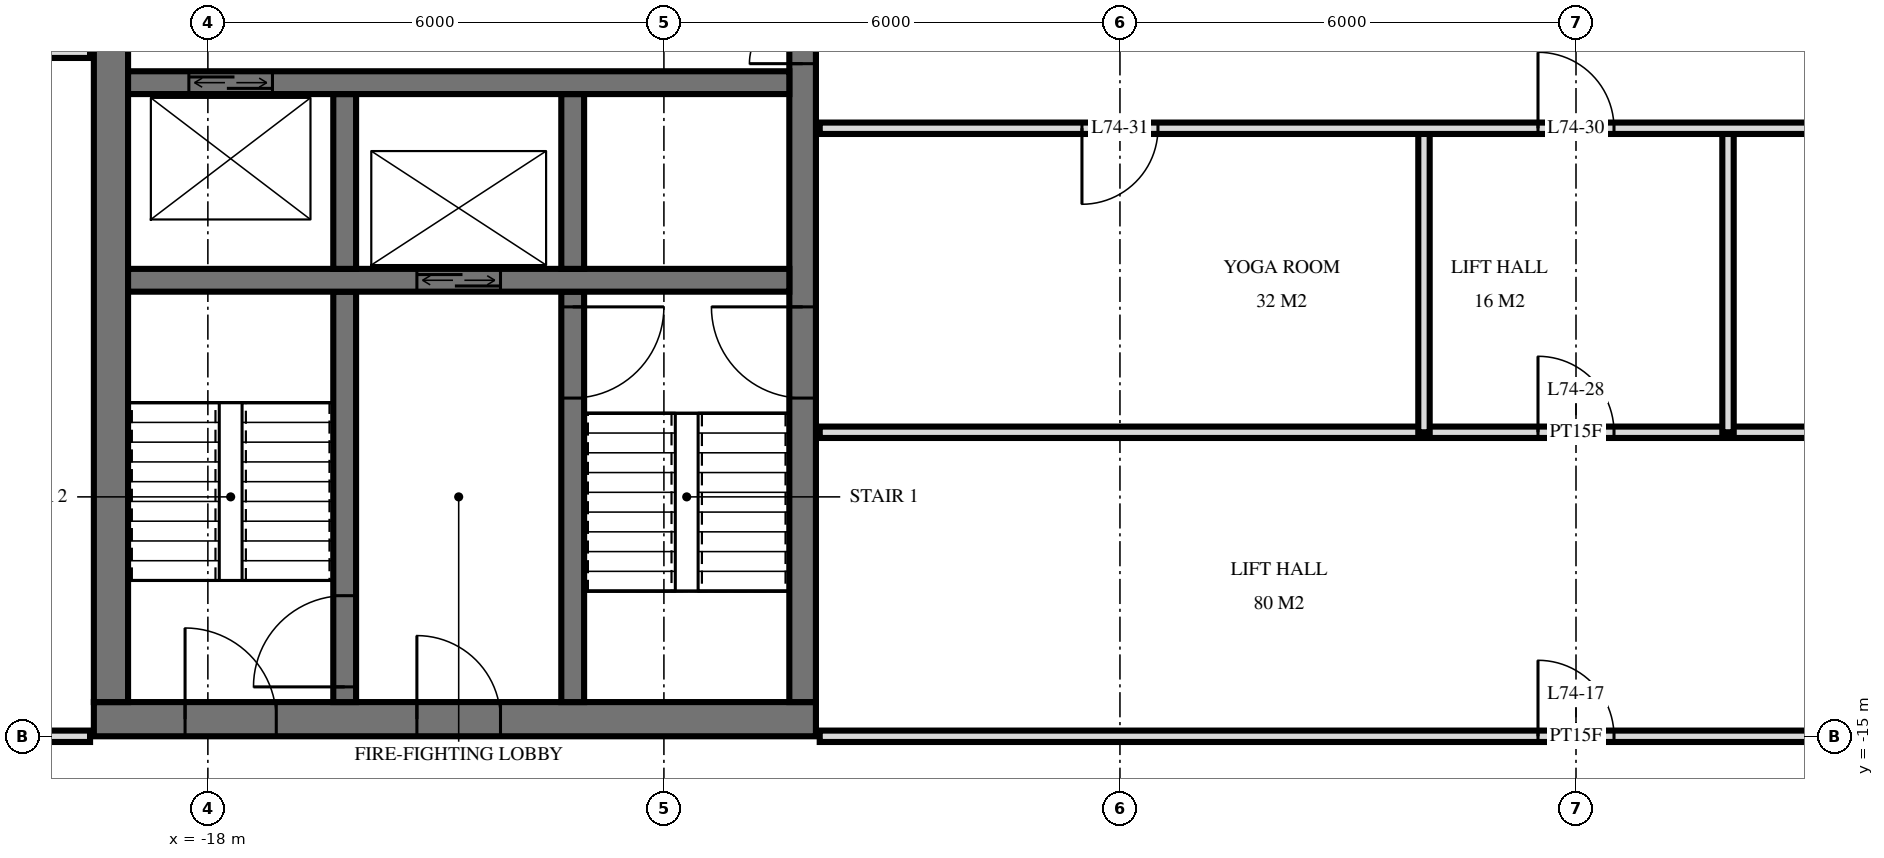
"""IFC4 building model, lengths in metres.
Left out: names, types, materials, properties, quantities, classifications, styles, units other than length and angle.
Written with IfcOpenShell. Run it as: python <this file> out.ifc"""

import sys

from ifc_helpers import new_model, si_unit, direction, frame, frame_2d, origin, place, context, subcontext, project, spatial, rectangle, extrude, element, fill, save


model = new_model("IFC4")
c1 = context("Model", 3, precision=1e-05, world=origin(), true_north=direction((0.0, 1.0)))
c2 = subcontext(c1, "Body", "Model", "MODEL_VIEW")
j1 = project(units=[si_unit("LENGTHUNIT", "METRE"), si_unit("PLANEANGLEUNIT", "RADIAN")], contexts=[c1])
p1 = place(None, origin())
s1 = spatial("IfcSite", under=j1, at=p1, CompositionType="ELEMENT")
p2 = place(p1, origin())
s2 = spatial("IfcBuilding", under=s1, at=p2, CompositionType="ELEMENT")
p3 = place(p2, frame((0.0, 0.0, 280.6)))
s3 = spatial("IfcBuildingStorey", under=s2, at=p3, CompositionType="ELEMENT", Elevation=280.6)
p4 = place(p3, frame((-19.5, -14.775, 0.0), z_axis=(0.0, 0.0, 1.0), x_axis=(1.0, 0.0, 0.0)))
e1 = element("IfcWall", 1, at=p4, inside=s3, PredefinedType="SHEAR", context=c2, shape_type="SweptSolid", body=[
    extrude(rectangle(XDim=9.5, YDim=0.45, at=frame_2d((4.75, 0.0))), origin(), (0.0, 0.0, 1.0), 3.5),
])
p5 = place(p4, frame((1.2, 0.0, 0.0)))
e2 = element("IfcOpeningElement", 2, at=p5, cuts=e1, PredefinedType="OPENING", context=c2, shape_type="SweptSolid", body=[
    extrude(rectangle(XDim=1.2, YDim=2.1, at=frame_2d((0.6, 1.05))), frame((0.0, 0.235, 0.0), z_axis=(0.0, -1.0, 0.0), x_axis=(1.0, 0.0, 0.0)), (0.0, 0.0, 1.0), 0.47),
])
p6 = place(p4, frame((4.25, 0.0, 0.0)))
e3 = element("IfcOpeningElement", 3, at=p6, cuts=e1, PredefinedType="OPENING", context=c2, shape_type="SweptSolid", body=[
    extrude(rectangle(XDim=1.1, YDim=2.1, at=frame_2d((0.55, 1.05))), frame((0.0, 0.235, 0.0), z_axis=(0.0, -1.0, 0.0), x_axis=(1.0, 0.0, 0.0)), (0.0, 0.0, 1.0), 0.47),
])
p7 = place(p3, frame((-10.175, -14.55, 0.0), z_axis=(0.0, 0.0, 1.0), x_axis=(0.0, 1.0, 0.0)))
e4 = element("IfcWall", 4, at=p7, inside=s3, PredefinedType="SHEAR", context=c2, shape_type="SweptSolid", body=[
    extrude(rectangle(XDim=14.1, YDim=0.35, at=frame_2d((7.05, 0.0))), origin(), (0.0, 0.0, 1.0), 3.5),
])
p8 = place(p7, frame((8.4, 0.0, 0.0)))
e5 = element("IfcOpeningElement", 5, at=p8, cuts=e4, PredefinedType="OPENING", context=c2, shape_type="SweptSolid", body=[
    extrude(rectangle(XDim=1.4, YDim=2.4, at=frame_2d((0.7, 1.2))), frame((0.0, 0.185, 0.0), z_axis=(0.0, -1.0, 0.0), x_axis=(1.0, 0.0, 0.0)), (0.0, 0.0, 1.0), 0.37),
])
p9 = place(p7, frame((10.0, 0.0, 0.0)))
e6 = element("IfcOpeningElement", 6, at=p9, cuts=e4, PredefinedType="OPENING", context=c2, shape_type="SweptSolid", body=[
    extrude(rectangle(XDim=1.4, YDim=2.4, at=frame_2d((0.7, 1.2))), frame((0.0, 0.185, 0.0), z_axis=(0.0, -1.0, 0.0), x_axis=(1.0, 0.0, 0.0)), (0.0, 0.0, 1.0), 0.37),
])
p10 = place(p7, frame((4.0, 0.0, 0.0)))
e7 = element("IfcOpeningElement", 7, at=p10, cuts=e4, PredefinedType="OPENING", context=c2, shape_type="SweptSolid", body=[
    extrude(rectangle(XDim=1.2, YDim=2.1, at=frame_2d((0.6, 1.05))), frame((0.0, 0.185, 0.0), z_axis=(0.0, -1.0, 0.0), x_axis=(1.0, 0.0, 0.0)), (0.0, 0.0, 1.0), 0.37),
])
p11 = place(p3, frame((-19.275, -14.55, 0.0), z_axis=(0.0, 0.0, 1.0), x_axis=(0.0, 1.0, 0.0)))
e8 = element("IfcWall", 8, at=p11, inside=s3, PredefinedType="SHEAR", context=c2, shape_type="SweptSolid", body=[
    extrude(rectangle(XDim=14.1, YDim=0.45, at=frame_2d((7.05, 0.0))), origin(), (0.0, 0.0, 1.0), 3.5),
])
p12 = place(p3, frame((-19.05, -6.4, 0.0), z_axis=(0.0, 0.0, 1.0), x_axis=(1.0, 0.0, 0.0)))
e9 = element("IfcWall", 9, at=p12, inside=s3, PredefinedType="SHEAR", context=c2, shape_type="SweptSolid", body=[
    extrude(rectangle(XDim=8.7, YDim=0.3, at=frame_2d((4.35, 0.0))), origin(), (0.0, 0.0, 1.0), 3.5),
])
p13 = place(p12, frame((0.8, 0.0, 0.0)))
e10 = element("IfcOpeningElement", 10, at=p13, cuts=e9, PredefinedType="OPENING", context=c2, shape_type="SweptSolid", body=[
    extrude(rectangle(XDim=1.1, YDim=2.1, at=frame_2d((0.55, 1.05))), frame((0.0, 0.16, 0.0), z_axis=(0.0, -1.0, 0.0), x_axis=(1.0, 0.0, 0.0)), (0.0, 0.0, 1.0), 0.32),
])
p14 = place(p3, frame((-19.05, -9.0, 0.0), z_axis=(0.0, 0.0, 1.0), x_axis=(1.0, 0.0, 0.0)))
e11 = element("IfcWall", 11, at=p14, inside=s3, PredefinedType="SHEAR", context=c2, shape_type="SweptSolid", body=[
    extrude(rectangle(XDim=8.7, YDim=0.3, at=frame_2d((4.35, 0.0))), origin(), (0.0, 0.0, 1.0), 3.5),
])
p15 = place(p14, frame((3.8, 0.0, 0.0)))
e12 = element("IfcOpeningElement", 12, at=p15, cuts=e11, PredefinedType="OPENING", context=c2, shape_type="SweptSolid", body=[
    extrude(rectangle(XDim=1.1, YDim=2.1, at=frame_2d((0.55, 1.05))), frame((0.0, 0.16, 0.0), z_axis=(0.0, -1.0, 0.0), x_axis=(1.0, 0.0, 0.0)), (0.0, 0.0, 1.0), 0.32),
])
p16 = place(p3, frame((-13.2, -8.85, 0.0), z_axis=(0.0, 0.0, 1.0), x_axis=(0.0, 1.0, 0.0)))
e13 = element("IfcWall", 13, at=p16, inside=s3, PredefinedType="SHEAR", context=c2, shape_type="SweptSolid", body=[
    extrude(rectangle(XDim=2.3, YDim=0.3, at=frame_2d((1.15, 0.0))), origin(), (0.0, 0.0, 1.0), 3.5),
])
p17 = place(p3, frame((-13.2, -14.55, 0.0), z_axis=(0.0, 0.0, 1.0), x_axis=(0.0, 1.0, 0.0)))
e14 = element("IfcWall", 14, at=p17, inside=s3, PredefinedType="SHEAR", context=c2, shape_type="SweptSolid", body=[
    extrude(rectangle(XDim=5.4, YDim=0.3, at=frame_2d((2.7, 0.0))), origin(), (0.0, 0.0, 1.0), 3.5),
])
p18 = place(p17, frame((4.0, 0.0, 0.0)))
e15 = element("IfcOpeningElement", 15, at=p18, cuts=e14, PredefinedType="OPENING", context=c2, shape_type="SweptSolid", body=[
    extrude(rectangle(XDim=1.2, YDim=2.1, at=frame_2d((0.6, 1.05))), frame((0.0, 0.16, 0.0), z_axis=(0.0, -1.0, 0.0), x_axis=(1.0, 0.0, 0.0)), (0.0, 0.0, 1.0), 0.32),
])
p19 = place(p3, frame((-16.2, -8.85, 0.0), z_axis=(0.0, 0.0, 1.0), x_axis=(0.0, 1.0, 0.0)))
e16 = element("IfcWall", 16, at=p19, inside=s3, PredefinedType="SHEAR", context=c2, shape_type="SweptSolid", body=[
    extrude(rectangle(XDim=2.3, YDim=0.3, at=frame_2d((1.15, 0.0))), origin(), (0.0, 0.0, 1.0), 3.5),
])
p20 = place(p3, frame((-16.2, -14.55, 0.0), z_axis=(0.0, 0.0, 1.0), x_axis=(0.0, 1.0, 0.0)))
e17 = element("IfcWall", 17, at=p20, inside=s3, PredefinedType="SHEAR", context=c2, shape_type="SweptSolid", body=[
    extrude(rectangle(XDim=5.4, YDim=0.3, at=frame_2d((2.7, 0.0))), origin(), (0.0, 0.0, 1.0), 3.5),
])
p21 = place(p20, frame((0.2, 0.0, 0.0)))
e18 = element("IfcOpeningElement", 18, at=p21, cuts=e17, PredefinedType="OPENING", context=c2, shape_type="SweptSolid", body=[
    extrude(rectangle(XDim=1.2, YDim=2.1, at=frame_2d((0.6, 1.05))), frame((0.0, 0.16, 0.0), z_axis=(0.0, -1.0, 0.0), x_axis=(1.0, 0.0, 0.0)), (0.0, 0.0, 1.0), 0.32),
])
for number, where, z_axis, x_axis in (
    (19, (2.0, -11.0, 0.0), (0.0, 0.0, 1.0), (0.0, 1.0, 0.0)),
    (20, (-2.0, -11.0, 0.0), (0.0, 0.0, 1.0), (0.0, 1.0, 0.0)),
):
    element("IfcWall", number, at=place(p3, frame(where, z_axis=z_axis, x_axis=x_axis)), inside=s3, PredefinedType="PARTITIONING", context=c2, shape_type="SweptSolid", body=[
        extrude(rectangle(XDim=4.0, YDim=0.15, at=frame_2d((2.0, 0.0))), origin(), (0.0, 0.0, 1.0), 3.22),
    ])
p22 = place(p3, frame((-22.92, -15.0, 0.0), z_axis=(0.0, 0.0, 1.0), x_axis=(1.0, 0.0, 0.0)))
e21 = element("IfcWall", 21, at=p22, inside=s3, PredefinedType="PARTITIONING", context=c2, shape_type="SweptSolid", body=[
    extrude(rectangle(XDim=3.37, YDim=0.15, at=frame_2d((1.685, 0.0))), origin(), (0.0, 0.0, 1.0), 3.22),
])
p23 = place(p22, frame((1.47, 0.0, 0.0)))
e22 = element("IfcOpeningElement", 22, at=p23, cuts=e21, PredefinedType="OPENING", context=c2, shape_type="SweptSolid", body=[
    extrude(rectangle(XDim=1.0, YDim=2.1, at=frame_2d((0.5, 1.05))), frame((0.0, 0.085, 0.0), z_axis=(0.0, -1.0, 0.0), x_axis=(1.0, 0.0, 0.0)), (0.0, 0.0, 1.0), 0.17),
])
p24 = place(p3, frame((-9.95, -15.0, 0.0), z_axis=(0.0, 0.0, 1.0), x_axis=(1.0, 0.0, 0.0)))
e23 = element("IfcWall", 23, at=p24, inside=s3, PredefinedType="PARTITIONING", context=c2, shape_type="SweptSolid", body=[
    extrude(rectangle(XDim=19.9, YDim=0.15, at=frame_2d((9.95, 0.0))), origin(), (0.0, 0.0, 1.0), 2.584),
])
p25 = place(p24, frame((9.45, 0.0, 0.0)))
e24 = element("IfcOpeningElement", 24, at=p25, cuts=e23, PredefinedType="OPENING", context=c2, shape_type="SweptSolid", body=[
    extrude(rectangle(XDim=1.0, YDim=2.1, at=frame_2d((0.5, 1.05))), frame((0.0, 0.085, 0.0), z_axis=(0.0, -1.0, 0.0), x_axis=(1.0, 0.0, 0.0)), (0.0, 0.0, 1.0), 0.17),
])
p26 = place(p3, frame((-9.95, -11.0, 0.0), z_axis=(0.0, 0.0, 1.0), x_axis=(1.0, 0.0, 0.0)))
e25 = element("IfcWall", 25, at=p26, inside=s3, PredefinedType="PARTITIONING", context=c2, shape_type="SweptSolid", body=[
    extrude(rectangle(XDim=19.9, YDim=0.15, at=frame_2d((9.95, 0.0))), origin(), (0.0, 0.0, 1.0), 3.22),
])
p27 = place(p26, frame((9.45, 0.0, 0.0)))
e26 = element("IfcOpeningElement", 26, at=p27, cuts=e25, PredefinedType="OPENING", context=c2, shape_type="SweptSolid", body=[
    extrude(rectangle(XDim=1.0, YDim=2.1, at=frame_2d((0.5, 1.05))), frame((0.0, 0.085, 0.0), z_axis=(0.0, -1.0, 0.0), x_axis=(1.0, 0.0, 0.0)), (0.0, 0.0, 1.0), 0.17),
])
p28 = place(p26, frame((15.45, 0.0, 0.0)))
e27 = element("IfcOpeningElement", 27, at=p28, cuts=e25, PredefinedType="OPENING", context=c2, shape_type="SweptSolid", body=[
    extrude(rectangle(XDim=1.0, YDim=2.1, at=frame_2d((0.5, 1.05))), frame((0.0, 0.085, 0.0), z_axis=(0.0, -1.0, 0.0), x_axis=(1.0, 0.0, 0.0)), (0.0, 0.0, 1.0), 0.17),
])
p29 = place(p3, frame((-9.95, -7.0, 0.0), z_axis=(0.0, 0.0, 1.0), x_axis=(1.0, 0.0, 0.0)))
e28 = element("IfcWall", 28, at=p29, inside=s3, PredefinedType="PARTITIONING", context=c2, shape_type="SweptSolid", body=[
    extrude(rectangle(XDim=19.9, YDim=0.15, at=frame_2d((9.95, 0.0))), origin(), (0.0, 0.0, 1.0), 3.22),
])
p30 = place(p29, frame((9.45, 0.0, 0.0)))
e29 = element("IfcOpeningElement", 29, at=p30, cuts=e28, PredefinedType="OPENING", context=c2, shape_type="SweptSolid", body=[
    extrude(rectangle(XDim=1.0, YDim=2.1, at=frame_2d((0.5, 1.05))), frame((0.0, 0.085, 0.0), z_axis=(0.0, -1.0, 0.0), x_axis=(1.0, 0.0, 0.0)), (0.0, 0.0, 1.0), 0.17),
])
p31 = place(p29, frame((3.45, 0.0, 0.0)))
e30 = element("IfcOpeningElement", 30, at=p31, cuts=e28, PredefinedType="OPENING", context=c2, shape_type="SweptSolid", body=[
    extrude(rectangle(XDim=1.0, YDim=2.1, at=frame_2d((0.5, 1.05))), frame((0.0, 0.085, 0.0), z_axis=(0.0, -1.0, 0.0), x_axis=(1.0, 0.0, 0.0)), (0.0, 0.0, 1.0), 0.17),
])
p32 = place(p3, frame((-22.92, -6.0, 0.0), z_axis=(0.0, 0.0, 1.0), x_axis=(1.0, 0.0, 0.0)))
e31 = element("IfcWall", 31, at=p32, inside=s3, PredefinedType="PARTITIONING", context=c2, shape_type="SweptSolid", body=[
    extrude(rectangle(XDim=3.37, YDim=0.15, at=frame_2d((1.685, 0.0))), origin(), (0.0, 0.0, 1.0), 3.22),
])
p33 = place(p32, frame((1.17, 0.0, 0.0)))
e32 = element("IfcOpeningElement", 32, at=p33, cuts=e31, PredefinedType="OPENING", context=c2, shape_type="SweptSolid", body=[
    extrude(rectangle(XDim=0.9, YDim=2.1, at=frame_2d((0.45, 1.05))), frame((0.0, 0.085, 0.0), z_axis=(0.0, -1.0, 0.0), x_axis=(1.0, 0.0, 0.0)), (0.0, 0.0, 1.0), 0.17),
])
p34 = place(p15, origin())
e33 = element("IfcDoor", 33, at=p34, inside=s3, OperationType="DOUBLE_DOOR_SLIDING", PredefinedType="USERDEFINED", context=c2, shape_type="SweptSolid", body=[
    extrude(rectangle(XDim=1.1, YDim=2.1, at=frame_2d((0.55, 1.05))), frame((0.0, 0.025, 0.0), z_axis=(0.0, -1.0, 0.0), x_axis=(1.0, 0.0, 0.0)), (0.0, 0.0, 1.0), 0.05),
])
fill(e12, e33)
p35 = place(p13, origin())
e34 = element("IfcDoor", 34, at=p35, inside=s3, OperationType="DOUBLE_DOOR_SLIDING", PredefinedType="USERDEFINED", context=c2, shape_type="SweptSolid", body=[
    extrude(rectangle(XDim=1.1, YDim=2.1, at=frame_2d((0.55, 1.05))), frame((0.0, 0.025, 0.0), z_axis=(0.0, -1.0, 0.0), x_axis=(1.0, 0.0, 0.0)), (0.0, 0.0, 1.0), 0.05),
])
fill(e10, e34)
p36 = place(p8, origin())
e35 = element("IfcDoor", 35, at=p36, inside=s3, OperationType="DOUBLE_DOOR_SINGLE_SWING", PredefinedType="DOOR", context=c2, shape_type="SweptSolid", body=[
    extrude(rectangle(XDim=1.4, YDim=2.4, at=frame_2d((0.7, 1.2))), frame((0.0, 0.025, 0.0), z_axis=(0.0, -1.0, 0.0), x_axis=(1.0, 0.0, 0.0)), (0.0, 0.0, 1.0), 0.05),
])
fill(e5, e35)
p37 = place(p10, origin())
e36 = element("IfcDoor", 36, at=p37, inside=s3, OperationType="SINGLE_SWING_LEFT", PredefinedType="DOOR", context=c2, shape_type="SweptSolid", body=[
    extrude(rectangle(XDim=1.2, YDim=2.1, at=frame_2d((0.6, 1.05))), frame((0.0, 0.025, 0.0), z_axis=(0.0, -1.0, 0.0), x_axis=(1.0, 0.0, 0.0)), (0.0, 0.0, 1.0), 0.05),
])
fill(e7, e36)
p38 = place(p5, origin())
e37 = element("IfcDoor", 37, at=p38, inside=s3, OperationType="SINGLE_SWING_RIGHT", PredefinedType="DOOR", context=c2, shape_type="SweptSolid", body=[
    extrude(rectangle(XDim=1.2, YDim=2.1, at=frame_2d((0.6, 1.05))), frame((0.0, 0.025, 0.0), z_axis=(0.0, -1.0, 0.0), x_axis=(1.0, 0.0, 0.0)), (0.0, 0.0, 1.0), 0.05),
])
fill(e2, e37)
p39 = place(p6, origin())
e38 = element("IfcDoor", 38, at=p39, inside=s3, OperationType="SINGLE_SWING_RIGHT", PredefinedType="DOOR", context=c2, shape_type="SweptSolid", body=[
    extrude(rectangle(XDim=1.1, YDim=2.1, at=frame_2d((0.55, 1.05))), frame((0.0, 0.025, 0.0), z_axis=(0.0, -1.0, 0.0), x_axis=(1.0, 0.0, 0.0)), (0.0, 0.0, 1.0), 0.05),
])
fill(e3, e38)
p40 = place(p18, frame((0.6, 0.0, 0.0), z_axis=(0.0, 0.0, 1.0), x_axis=(-1.0, 0.0, 0.0)))
e39 = element("IfcDoor", 39, at=p40, inside=s3, OperationType="SINGLE_SWING_RIGHT", PredefinedType="DOOR", context=c2, shape_type="SweptSolid", body=[
    extrude(rectangle(XDim=1.2, YDim=2.1, at=frame_2d((0.0, 1.05))), frame((0.0, -0.025, 0.0), z_axis=(0.0, 1.0, 0.0), x_axis=(-1.0, 0.0, 0.0)), (0.0, 0.0, 1.0), 0.05),
])
fill(e15, e39)
p41 = place(p21, origin())
e40 = element("IfcDoor", 40, at=p41, inside=s3, OperationType="SINGLE_SWING_RIGHT", PredefinedType="DOOR", context=c2, shape_type="SweptSolid", body=[
    extrude(rectangle(XDim=1.2, YDim=2.1, at=frame_2d((0.6, 1.05))), frame((0.0, 0.025, 0.0), z_axis=(0.0, -1.0, 0.0), x_axis=(1.0, 0.0, 0.0)), (0.0, 0.0, 1.0), 0.05),
])
fill(e18, e40)
p42 = place(p25, origin())
e41 = element("IfcDoor", 41, at=p42, inside=s3, OperationType="SINGLE_SWING_RIGHT", PredefinedType="DOOR", context=c2, shape_type="SweptSolid", body=[
    extrude(rectangle(XDim=1.0, YDim=2.1, at=frame_2d((0.5, 1.05))), frame((0.0, 0.025, 0.0), z_axis=(0.0, -1.0, 0.0), x_axis=(1.0, 0.0, 0.0)), (0.0, 0.0, 1.0), 0.05),
])
fill(e24, e41)
p43 = place(p27, origin())
e42 = element("IfcDoor", 42, at=p43, inside=s3, OperationType="SINGLE_SWING_RIGHT", PredefinedType="DOOR", context=c2, shape_type="SweptSolid", body=[
    extrude(rectangle(XDim=1.0, YDim=2.1, at=frame_2d((0.5, 1.05))), frame((0.0, 0.025, 0.0), z_axis=(0.0, -1.0, 0.0), x_axis=(1.0, 0.0, 0.0)), (0.0, 0.0, 1.0), 0.05),
])
fill(e26, e42)
p44 = place(p30, origin())
e43 = element("IfcDoor", 43, at=p44, inside=s3, OperationType="SINGLE_SWING_RIGHT", PredefinedType="DOOR", context=c2, shape_type="SweptSolid", body=[
    extrude(rectangle(XDim=1.0, YDim=2.1, at=frame_2d((0.5, 1.05))), frame((0.0, 0.025, 0.0), z_axis=(0.0, -1.0, 0.0), x_axis=(1.0, 0.0, 0.0)), (0.0, 0.0, 1.0), 0.05),
])
fill(e29, e43)
p45 = place(p31, frame((0.5, 0.0, 0.0), z_axis=(0.0, 0.0, 1.0), x_axis=(-1.0, 0.0, 0.0)))
e44 = element("IfcDoor", 44, at=p45, inside=s3, OperationType="SINGLE_SWING_LEFT", PredefinedType="DOOR", context=c2, shape_type="SweptSolid", body=[
    extrude(rectangle(XDim=1.0, YDim=2.1, at=frame_2d((0.0, 1.05))), frame((0.0, -0.025, 0.0), z_axis=(0.0, 1.0, 0.0), x_axis=(-1.0, 0.0, 0.0)), (0.0, 0.0, 1.0), 0.05),
])
fill(e30, e44)
save(model, sys.argv[1])
